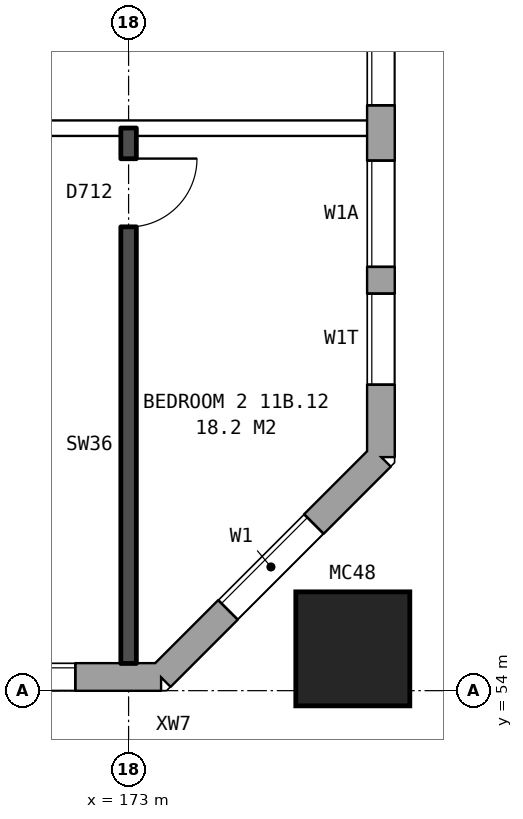
"""IFC4 building model, lengths in metres.
Left out: names, types, materials, properties, quantities, classifications, styles, units other than length and angle.
Written with IfcOpenShell. Run it as: python <this file> out.ifc"""

import sys

from ifc_helpers import new_model, si_unit, direction, frame, frame_2d, origin, origin_2d, place, context, subcontext, project, spatial, rectangle, hollow_rectangle, extrude, element, fill, save


model = new_model("IFC4")
c1 = context("Model", 3, precision=1e-05, world=origin(), true_north=direction((0.0, 1.0)))
c2 = subcontext(c1, "Body", "Model", "MODEL_VIEW")
j1 = project(units=[si_unit("LENGTHUNIT", "METRE"), si_unit("PLANEANGLEUNIT", "RADIAN")], contexts=[c1])
p1 = place(None, origin())
s1 = spatial("IfcSite", under=j1, at=p1, CompositionType="ELEMENT")
p2 = place(p1, origin())
s2 = spatial("IfcBuilding", under=s1, at=p2, CompositionType="ELEMENT")
p3 = place(p2, frame((0.0, 0.0, 44.3)))
s3 = spatial("IfcBuildingStorey", under=s2, at=p3, CompositionType="ELEMENT", Elevation=44.3)
p4 = place(p3, frame((175.95, 54.55, 0.0), z_axis=(0.0, 0.0, 1.0), x_axis=(1.0, 0.0, 0.0)))
e1 = element("IfcColumn", 1, at=p4, inside=s3, PredefinedType="COLUMN", context=c2, shape_type="SweptSolid", body=[
    extrude(hollow_rectangle(XDim=1.5, YDim=1.5, WallThickness=0.08, at=origin_2d()), origin(), (0.0, 0.0, 1.0), 3.1),
])
p5 = place(p3, frame((134.075, 54.18, 0.0), z_axis=(0.0, 0.0, 1.0), x_axis=(1.0, 0.0, 0.0)))
e2 = element("IfcWall", 2, at=p5, inside=s3, PredefinedType="STANDARD", context=c2, shape_type="SweptSolid", body=[
    extrude(rectangle(XDim=39.351, YDim=0.36, at=frame_2d((19.675, 0.0))), origin(), (0.0, 0.0, 1.0), 2.85),
])
p6 = place(p5, frame((0.3, 0.0, 0.8)))
e3 = element("IfcOpeningElement", 3, at=p6, cuts=e2, PredefinedType="OPENING", context=c2, shape_type="SweptSolid", body=[
    extrude(rectangle(XDim=0.6, YDim=0.9, at=frame_2d((0.3, 0.45))), frame((0.0, 0.19, 0.0), z_axis=(0.0, -1.0, 0.0), x_axis=(1.0, 0.0, 0.0)), (0.0, 0.0, 1.0), 0.38),
])
p7 = place(p5, frame((3.625, 0.0, 0.8)))
e4 = element("IfcOpeningElement", 4, at=p7, cuts=e2, PredefinedType="OPENING", context=c2, shape_type="SweptSolid", body=[
    extrude(rectangle(XDim=1.6, YDim=1.8, at=frame_2d((0.8, 0.9))), frame((0.0, 0.19, 0.0), z_axis=(0.0, -1.0, 0.0), x_axis=(1.0, 0.0, 0.0)), (0.0, 0.0, 1.0), 0.38),
])
p8 = place(p5, frame((6.625, 0.0, 0.8)))
e5 = element("IfcOpeningElement", 5, at=p8, cuts=e2, PredefinedType="OPENING", context=c2, shape_type="SweptSolid", body=[
    extrude(rectangle(XDim=1.6, YDim=1.8, at=frame_2d((0.8, 0.9))), frame((0.0, 0.19, 0.0), z_axis=(0.0, -1.0, 0.0), x_axis=(1.0, 0.0, 0.0)), (0.0, 0.0, 1.0), 0.38),
])
p9 = place(p5, frame((9.625, 0.0, 0.8)))
e6 = element("IfcOpeningElement", 6, at=p9, cuts=e2, PredefinedType="OPENING", context=c2, shape_type="SweptSolid", body=[
    extrude(rectangle(XDim=1.6, YDim=1.8, at=frame_2d((0.8, 0.9))), frame((0.0, 0.19, 0.0), z_axis=(0.0, -1.0, 0.0), x_axis=(1.0, 0.0, 0.0)), (0.0, 0.0, 1.0), 0.38),
])
p10 = place(p5, frame((12.625, 0.0, 0.8)))
e7 = element("IfcOpeningElement", 7, at=p10, cuts=e2, PredefinedType="OPENING", context=c2, shape_type="SweptSolid", body=[
    extrude(rectangle(XDim=1.6, YDim=1.8, at=frame_2d((0.8, 0.9))), frame((0.0, 0.19, 0.0), z_axis=(0.0, -1.0, 0.0), x_axis=(1.0, 0.0, 0.0)), (0.0, 0.0, 1.0), 0.38),
])
p11 = place(p5, frame((15.625, 0.0, 0.8)))
e8 = element("IfcOpeningElement", 8, at=p11, cuts=e2, PredefinedType="OPENING", context=c2, shape_type="SweptSolid", body=[
    extrude(rectangle(XDim=1.6, YDim=1.8, at=frame_2d((0.8, 0.9))), frame((0.0, 0.19, 0.0), z_axis=(0.0, -1.0, 0.0), x_axis=(1.0, 0.0, 0.0)), (0.0, 0.0, 1.0), 0.38),
])
p12 = place(p5, frame((18.625, 0.0, 0.8)))
e9 = element("IfcOpeningElement", 9, at=p12, cuts=e2, PredefinedType="OPENING", context=c2, shape_type="SweptSolid", body=[
    extrude(rectangle(XDim=1.6, YDim=1.8, at=frame_2d((0.8, 0.9))), frame((0.0, 0.19, 0.0), z_axis=(0.0, -1.0, 0.0), x_axis=(1.0, 0.0, 0.0)), (0.0, 0.0, 1.0), 0.38),
])
p13 = place(p5, frame((21.625, 0.0, 0.8)))
e10 = element("IfcOpeningElement", 10, at=p13, cuts=e2, PredefinedType="OPENING", context=c2, shape_type="SweptSolid", body=[
    extrude(rectangle(XDim=1.6, YDim=1.8, at=frame_2d((0.8, 0.9))), frame((0.0, 0.19, 0.0), z_axis=(0.0, -1.0, 0.0), x_axis=(1.0, 0.0, 0.0)), (0.0, 0.0, 1.0), 0.38),
])
p14 = place(p5, frame((24.625, 0.0, 0.8)))
e11 = element("IfcOpeningElement", 11, at=p14, cuts=e2, PredefinedType="OPENING", context=c2, shape_type="SweptSolid", body=[
    extrude(rectangle(XDim=1.6, YDim=1.8, at=frame_2d((0.8, 0.9))), frame((0.0, 0.19, 0.0), z_axis=(0.0, -1.0, 0.0), x_axis=(1.0, 0.0, 0.0)), (0.0, 0.0, 1.0), 0.38),
])
p15 = place(p5, frame((27.625, 0.0, 0.8)))
e12 = element("IfcOpeningElement", 12, at=p15, cuts=e2, PredefinedType="OPENING", context=c2, shape_type="SweptSolid", body=[
    extrude(rectangle(XDim=1.6, YDim=1.8, at=frame_2d((0.8, 0.9))), frame((0.0, 0.19, 0.0), z_axis=(0.0, -1.0, 0.0), x_axis=(1.0, 0.0, 0.0)), (0.0, 0.0, 1.0), 0.38),
])
p16 = place(p5, frame((30.625, 0.0, 0.8)))
e13 = element("IfcOpeningElement", 13, at=p16, cuts=e2, PredefinedType="OPENING", context=c2, shape_type="SweptSolid", body=[
    extrude(rectangle(XDim=1.6, YDim=1.8, at=frame_2d((0.8, 0.9))), frame((0.0, 0.19, 0.0), z_axis=(0.0, -1.0, 0.0), x_axis=(1.0, 0.0, 0.0)), (0.0, 0.0, 1.0), 0.38),
])
p17 = place(p5, frame((33.625, 0.0, 0.8)))
e14 = element("IfcOpeningElement", 14, at=p17, cuts=e2, PredefinedType="OPENING", context=c2, shape_type="SweptSolid", body=[
    extrude(rectangle(XDim=1.6, YDim=1.8, at=frame_2d((0.8, 0.9))), frame((0.0, 0.19, 0.0), z_axis=(0.0, -1.0, 0.0), x_axis=(1.0, 0.0, 0.0)), (0.0, 0.0, 1.0), 0.38),
])
p18 = place(p5, frame((36.625, 0.0, 0.8)))
e15 = element("IfcOpeningElement", 15, at=p18, cuts=e2, PredefinedType="OPENING", context=c2, shape_type="SweptSolid", body=[
    extrude(rectangle(XDim=1.6, YDim=1.8, at=frame_2d((0.8, 0.9))), frame((0.0, 0.19, 0.0), z_axis=(0.0, -1.0, 0.0), x_axis=(1.0, 0.0, 0.0)), (0.0, 0.0, 1.0), 0.38),
])
p19 = place(p5, frame((1.25, 0.0, 0.8)))
e16 = element("IfcOpeningElement", 16, at=p19, cuts=e2, PredefinedType="OPENING", context=c2, shape_type="SweptSolid", body=[
    extrude(rectangle(XDim=1.4, YDim=1.8, at=frame_2d((0.7, 0.9))), frame((0.0, 0.19, 0.0), z_axis=(0.0, -1.0, 0.0), x_axis=(1.0, 0.0, 0.0)), (0.0, 0.0, 1.0), 0.38),
])
p20 = place(p3, frame((173.425, 54.18, 0.0), z_axis=(0.0, 0.0, 1.0), x_axis=(0.707106781187, 0.707106781187, 0.0)))
e17 = element("IfcWall", 17, at=p20, inside=s3, PredefinedType="STANDARD", context=c2, shape_type="SweptSolid", body=[
    extrude(rectangle(XDim=4.094, YDim=0.36, at=frame_2d((2.047, 0.0))), origin(), (0.0, 0.0, 1.0), 2.85),
])
p21 = place(p20, frame((1.247, 0.0, 0.8)))
e18 = element("IfcOpeningElement", 18, at=p21, cuts=e17, PredefinedType="OPENING", context=c2, shape_type="SweptSolid", body=[
    extrude(rectangle(XDim=1.6, YDim=1.8, at=frame_2d((0.8, 0.9))), frame((0.0, 0.19, 0.0), z_axis=(0.0, -1.0, 0.0), x_axis=(1.0, 0.0, 0.0)), (0.0, 0.0, 1.0), 0.38),
])
p22 = place(p3, frame((176.32, 57.075, 0.0), z_axis=(0.0, 0.0, 1.0), x_axis=(0.0, 1.0, 0.0)))
e19 = element("IfcWall", 19, at=p22, inside=s3, PredefinedType="STANDARD", context=c2, shape_type="SweptSolid", body=[
    extrude(rectangle(XDim=25.851, YDim=0.36, at=frame_2d((12.925, 0.0))), origin(), (0.0, 0.0, 1.0), 2.85),
])
p23 = place(p22, frame((0.95, 0.0, 0.8)))
e20 = element("IfcOpeningElement", 20, at=p23, cuts=e19, PredefinedType="OPENING", context=c2, shape_type="SweptSolid", body=[
    extrude(rectangle(XDim=1.2, YDim=0.9, at=frame_2d((0.6, 0.45))), frame((0.0, 0.19, 0.0), z_axis=(0.0, -1.0, 0.0), x_axis=(1.0, 0.0, 0.0)), (0.0, 0.0, 1.0), 0.38),
])
p24 = place(p22, frame((4.625, 0.0, 0.8)))
e21 = element("IfcOpeningElement", 21, at=p24, cuts=e19, PredefinedType="OPENING", context=c2, shape_type="SweptSolid", body=[
    extrude(rectangle(XDim=1.6, YDim=1.8, at=frame_2d((0.8, 0.9))), frame((0.0, 0.19, 0.0), z_axis=(0.0, -1.0, 0.0), x_axis=(1.0, 0.0, 0.0)), (0.0, 0.0, 1.0), 0.38),
])
p25 = place(p22, frame((7.625, 0.0, 0.8)))
e22 = element("IfcOpeningElement", 22, at=p25, cuts=e19, PredefinedType="OPENING", context=c2, shape_type="SweptSolid", body=[
    extrude(rectangle(XDim=1.6, YDim=1.8, at=frame_2d((0.8, 0.9))), frame((0.0, 0.19, 0.0), z_axis=(0.0, -1.0, 0.0), x_axis=(1.0, 0.0, 0.0)), (0.0, 0.0, 1.0), 0.38),
])
p26 = place(p22, frame((10.625, 0.0, 0.8)))
e23 = element("IfcOpeningElement", 23, at=p26, cuts=e19, PredefinedType="OPENING", context=c2, shape_type="SweptSolid", body=[
    extrude(rectangle(XDim=1.6, YDim=1.8, at=frame_2d((0.8, 0.9))), frame((0.0, 0.19, 0.0), z_axis=(0.0, -1.0, 0.0), x_axis=(1.0, 0.0, 0.0)), (0.0, 0.0, 1.0), 0.38),
])
p27 = place(p22, frame((13.625, 0.0, 0.8)))
e24 = element("IfcOpeningElement", 24, at=p27, cuts=e19, PredefinedType="OPENING", context=c2, shape_type="SweptSolid", body=[
    extrude(rectangle(XDim=1.6, YDim=1.8, at=frame_2d((0.8, 0.9))), frame((0.0, 0.19, 0.0), z_axis=(0.0, -1.0, 0.0), x_axis=(1.0, 0.0, 0.0)), (0.0, 0.0, 1.0), 0.38),
])
p28 = place(p22, frame((16.625, 0.0, 0.8)))
e25 = element("IfcOpeningElement", 25, at=p28, cuts=e19, PredefinedType="OPENING", context=c2, shape_type="SweptSolid", body=[
    extrude(rectangle(XDim=1.6, YDim=1.8, at=frame_2d((0.8, 0.9))), frame((0.0, 0.19, 0.0), z_axis=(0.0, -1.0, 0.0), x_axis=(1.0, 0.0, 0.0)), (0.0, 0.0, 1.0), 0.38),
])
p29 = place(p22, frame((19.625, 0.0, 0.8)))
e26 = element("IfcOpeningElement", 26, at=p29, cuts=e19, PredefinedType="OPENING", context=c2, shape_type="SweptSolid", body=[
    extrude(rectangle(XDim=1.6, YDim=1.8, at=frame_2d((0.8, 0.9))), frame((0.0, 0.19, 0.0), z_axis=(0.0, -1.0, 0.0), x_axis=(1.0, 0.0, 0.0)), (0.0, 0.0, 1.0), 0.38),
])
p30 = place(p22, frame((21.725, 0.0, 0.8)))
e27 = element("IfcOpeningElement", 27, at=p30, cuts=e19, PredefinedType="OPENING", context=c2, shape_type="SweptSolid", body=[
    extrude(rectangle(XDim=1.6, YDim=1.8, at=frame_2d((0.8, 0.9))), frame((0.0, 0.19, 0.0), z_axis=(0.0, -1.0, 0.0), x_axis=(1.0, 0.0, 0.0)), (0.0, 0.0, 1.0), 0.38),
])
p31 = place(p22, frame((2.5, 0.0, 0.8)))
e28 = element("IfcOpeningElement", 28, at=p31, cuts=e19, PredefinedType="OPENING", context=c2, shape_type="SweptSolid", body=[
    extrude(rectangle(XDim=1.4, YDim=1.8, at=frame_2d((0.7, 0.9))), frame((0.0, 0.19, 0.0), z_axis=(0.0, -1.0, 0.0), x_axis=(1.0, 0.0, 0.0)), (0.0, 0.0, 1.0), 0.38),
])
p32 = place(p22, frame((23.625, 0.0, 0.8)))
e29 = element("IfcOpeningElement", 29, at=p32, cuts=e19, PredefinedType="OPENING", context=c2, shape_type="SweptSolid", body=[
    extrude(rectangle(XDim=0.6, YDim=1.2, at=frame_2d((0.3, 0.6))), frame((0.0, 0.19, 0.0), z_axis=(0.0, -1.0, 0.0), x_axis=(1.0, 0.0, 0.0)), (0.0, 0.0, 1.0), 0.38),
])
p33 = place(p3, frame((155.1, 61.4, 0.0), z_axis=(0.0, 0.0, 1.0), x_axis=(1.0, 0.0, 0.0)))
e30 = element("IfcWall", 30, at=p33, inside=s3, PredefinedType="PARTITIONING", context=c2, shape_type="SweptSolid", body=[
    extrude(rectangle(XDim=21.04, YDim=0.2, at=frame_2d((10.52, 0.0))), origin(), (0.0, 0.0, 1.0), 2.85),
])
p34 = place(p33, frame((2.45, 0.0, 0.0)))
e31 = element("IfcOpeningElement", 31, at=p34, cuts=e30, PredefinedType="OPENING", context=c2, shape_type="SweptSolid", body=[
    extrude(rectangle(XDim=1.0, YDim=2.1, at=frame_2d((0.5, 1.05))), frame((0.0, 0.11, 0.0), z_axis=(0.0, -1.0, 0.0), x_axis=(1.0, 0.0, 0.0)), (0.0, 0.0, 1.0), 0.22),
])
p35 = place(p33, frame((14.4, 0.0, 0.0)))
e32 = element("IfcOpeningElement", 32, at=p35, cuts=e30, PredefinedType="OPENING", context=c2, shape_type="SweptSolid", body=[
    extrude(rectangle(XDim=1.0, YDim=2.1, at=frame_2d((0.5, 1.05))), frame((0.0, 0.11, 0.0), z_axis=(0.0, -1.0, 0.0), x_axis=(1.0, 0.0, 0.0)), (0.0, 0.0, 1.0), 0.22),
])
p36 = place(p3, frame((173.0, 54.36, 0.0), z_axis=(0.0, 0.0, 1.0), x_axis=(0.0, 1.0, 0.0)))
e33 = element("IfcWall", 33, at=p36, inside=s3, PredefinedType="SOLIDWALL", context=c2, shape_type="SweptSolid", body=[
    extrude(rectangle(XDim=7.04, YDim=0.2, at=frame_2d((3.52, 0.0))), origin(), (0.0, 0.0, 1.0), 2.85),
])
p37 = place(p36, frame((5.74, 0.0, 0.0)))
e34 = element("IfcOpeningElement", 34, at=p37, cuts=e33, PredefinedType="OPENING", context=c2, shape_type="SweptSolid", body=[
    extrude(rectangle(XDim=0.9, YDim=2.1, at=frame_2d((0.45, 1.05))), frame((0.0, 0.11, 0.0), z_axis=(0.0, -1.0, 0.0), x_axis=(1.0, 0.0, 0.0)), (0.0, 0.0, 1.0), 0.22),
])
p38 = place(p18, origin())
e35 = element("IfcWindow", 35, at=p38, inside=s3, PartitioningType="SINGLE_PANEL", PredefinedType="WINDOW", context=c2, shape_type="SweptSolid", body=[
    extrude(rectangle(XDim=1.6, YDim=1.8, at=frame_2d((0.8, 0.9))), frame((0.0, 0.15, 0.0), z_axis=(0.0, -1.0, 0.0), x_axis=(1.0, 0.0, 0.0)), (0.0, 0.0, 1.0), 0.06),
])
fill(e15, e35)
p39 = place(p21, origin())
e36 = element("IfcWindow", 36, at=p39, inside=s3, PartitioningType="SINGLE_PANEL", PredefinedType="WINDOW", context=c2, shape_type="SweptSolid", body=[
    extrude(rectangle(XDim=1.6, YDim=1.8, at=frame_2d((0.8, 0.9))), frame((0.0, 0.15, 0.0), z_axis=(0.0, -1.0, 0.0), x_axis=(1.0, 0.0, 0.0)), (0.0, 0.0, 1.0), 0.06),
])
fill(e18, e36)
p40 = place(p23, origin())
e37 = element("IfcWindow", 37, at=p40, inside=s3, PartitioningType="SINGLE_PANEL", PredefinedType="WINDOW", context=c2, shape_type="SweptSolid", body=[
    extrude(rectangle(XDim=1.2, YDim=0.9, at=frame_2d((0.6, 0.45))), frame((0.0, 0.15, 0.0), z_axis=(0.0, -1.0, 0.0), x_axis=(1.0, 0.0, 0.0)), (0.0, 0.0, 1.0), 0.06),
])
fill(e20, e37)
p41 = place(p24, origin())
e38 = element("IfcWindow", 38, at=p41, inside=s3, PartitioningType="SINGLE_PANEL", PredefinedType="WINDOW", context=c2, shape_type="SweptSolid", body=[
    extrude(rectangle(XDim=1.6, YDim=1.8, at=frame_2d((0.8, 0.9))), frame((0.0, 0.15, 0.0), z_axis=(0.0, -1.0, 0.0), x_axis=(1.0, 0.0, 0.0)), (0.0, 0.0, 1.0), 0.06),
])
fill(e21, e38)
p42 = place(p37, frame((0.9, 0.0, 0.0), z_axis=(0.0, 0.0, 1.0), x_axis=(-1.0, 0.0, 0.0)))
e39 = element("IfcDoor", 39, at=p42, inside=s3, OperationType="SINGLE_SWING_LEFT", PredefinedType="DOOR", context=c2, shape_type="SweptSolid", body=[
    extrude(rectangle(XDim=0.9, YDim=2.1, at=frame_2d((0.45, 1.05))), frame((0.0, 0.025, 0.0), z_axis=(0.0, -1.0, 0.0), x_axis=(1.0, 0.0, 0.0)), (0.0, 0.0, 1.0), 0.05),
])
fill(e34, e39)
p43 = place(p31, origin())
e40 = element("IfcWindow", 40, at=p43, inside=s3, PartitioningType="SINGLE_PANEL", PredefinedType="WINDOW", context=c2, shape_type="SweptSolid", body=[
    extrude(rectangle(XDim=1.4, YDim=1.8, at=frame_2d((0.7, 0.9))), frame((0.0, 0.15, 0.0), z_axis=(0.0, -1.0, 0.0), x_axis=(1.0, 0.0, 0.0)), (0.0, 0.0, 1.0), 0.06),
])
fill(e28, e40)
save(model, sys.argv[1])
